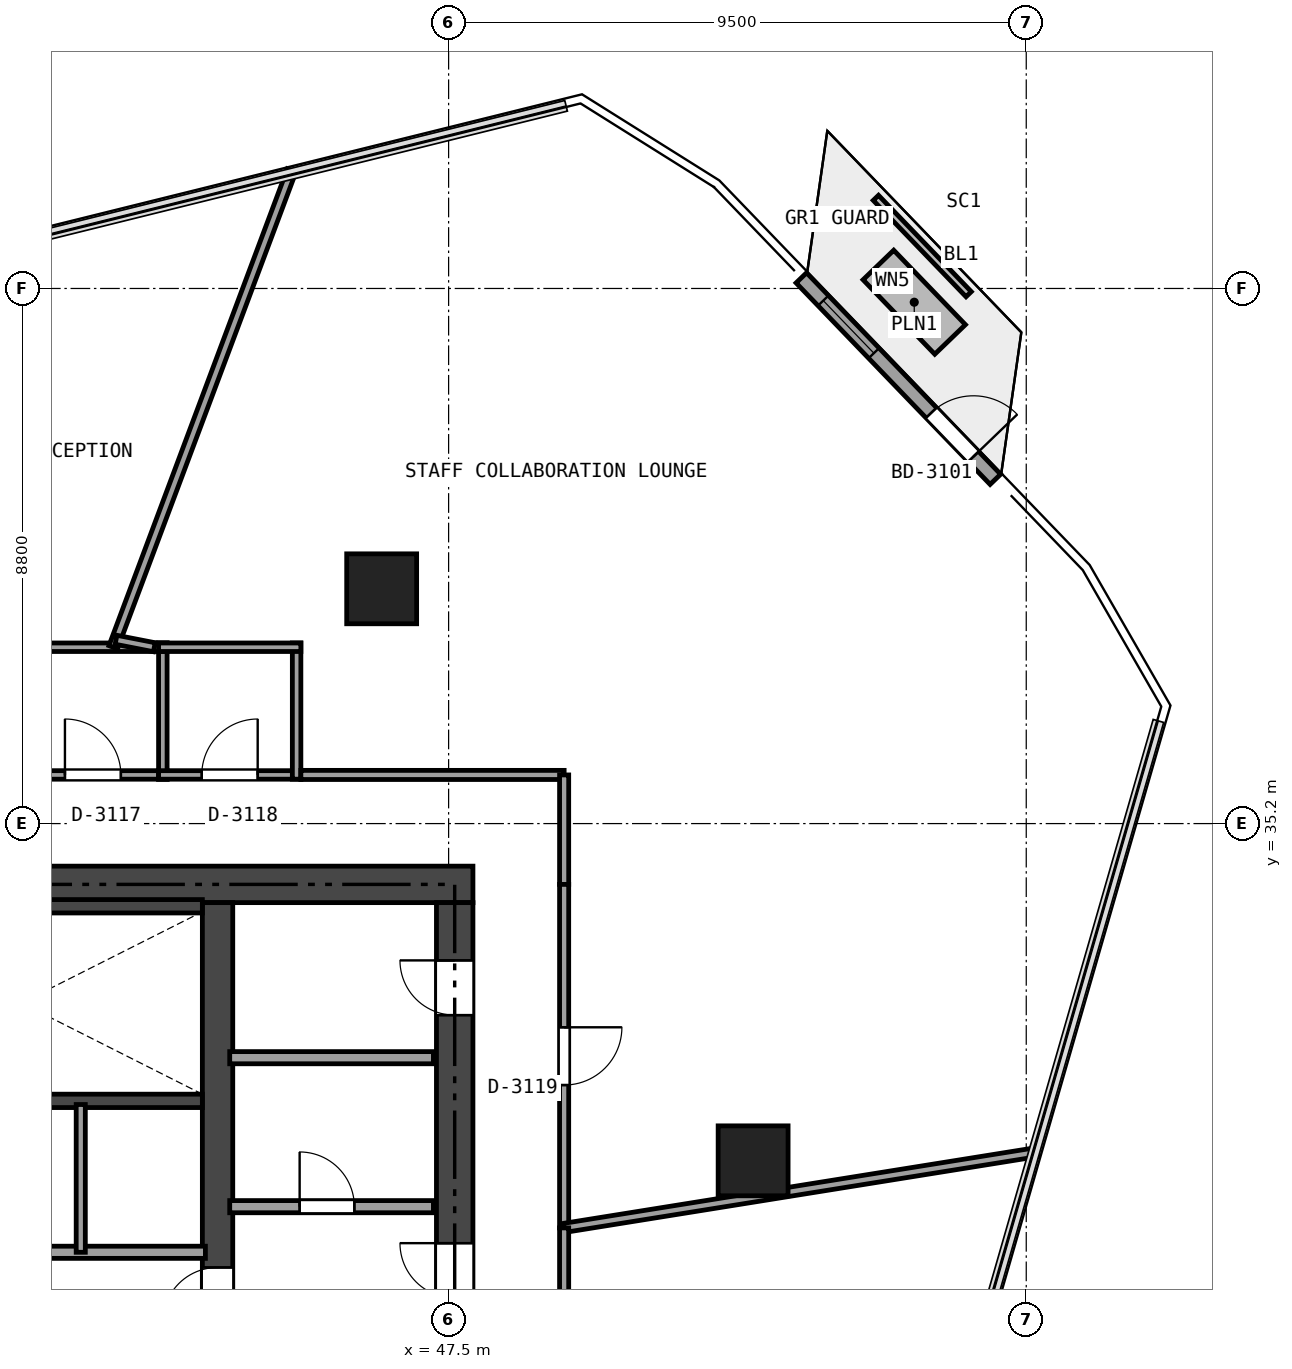
"""IFC4 building model, lengths in metres.
Left out: names, types, materials, properties, quantities, classifications, styles, units other than length and angle.
Written with IfcOpenShell. Run it as: python <this file> out.ifc"""

import sys

from ifc_helpers import new_model, si_unit, direction, frame, frame_2d, origin, origin_2d, place, context, subcontext, project, spatial, rectangle, extrude, element, fill, save


model = new_model("IFC4")
c1 = context("Model", 3, precision=1e-05, world=origin(), true_north=direction((0.0, 1.0)))
c2 = subcontext(c1, "Body", "Model", "MODEL_VIEW")
j1 = project(units=[si_unit("LENGTHUNIT", "METRE"), si_unit("PLANEANGLEUNIT", "RADIAN")], contexts=[c1])
p1 = place(None, origin())
s1 = spatial("IfcSite", under=j1, at=p1, CompositionType="ELEMENT")
p2 = place(p1, origin())
s2 = spatial("IfcBuilding", under=s1, at=p2, CompositionType="ELEMENT")
p3 = place(p2, frame((0.0, 0.0, 117.75)))
s3 = spatial("IfcBuildingStorey", under=s2, at=p3, CompositionType="ELEMENT", Elevation=117.75)
p4 = place(p3, frame((26.5, 34.2, 0.0), z_axis=(0.0, 0.0, 1.0), x_axis=(1.0, 0.0, 0.0)))
e1 = element("IfcWall", 1, at=p4, inside=s3, PredefinedType="SHEAR", context=c2, shape_type="SweptSolid", body=[
    extrude(rectangle(XDim=21.4, YDim=0.6, at=frame_2d((10.7, 0.0))), origin(), (0.0, 0.0, 1.0), 3.09),
])
p5 = place(p4, frame((9.7, 0.0, 0.0)))
e2 = element("IfcOpeningElement", 2, at=p5, cuts=e1, PredefinedType="OPENING", context=c2, shape_type="SweptSolid", body=[
    extrude(rectangle(XDim=1.1, YDim=2.15, at=frame_2d((0.55, 1.075))), frame((0.0, 0.31, 0.0), z_axis=(0.0, -1.0, 0.0), x_axis=(1.0, 0.0, 0.0)), (0.0, 0.0, 1.0), 0.62),
])
p6 = place(p4, frame((1.95, 0.0, 0.0)))
e3 = element("IfcOpeningElement", 3, at=p6, cuts=e1, PredefinedType="OPENING", context=c2, shape_type="SweptSolid", body=[
    extrude(rectangle(XDim=0.9, YDim=2.1, at=frame_2d((0.45, 1.05))), frame((0.0, 0.31, 0.0), z_axis=(0.0, -1.0, 0.0), x_axis=(1.0, 0.0, 0.0)), (0.0, 0.0, 1.0), 0.62),
])
p7 = place(p4, frame((6.25, 0.0, 0.0)))
e4 = element("IfcOpeningElement", 4, at=p7, cuts=e1, PredefinedType="OPENING", context=c2, shape_type="SweptSolid", body=[
    extrude(rectangle(XDim=0.9, YDim=2.1, at=frame_2d((0.45, 1.05))), frame((0.0, 0.31, 0.0), z_axis=(0.0, -1.0, 0.0), x_axis=(1.0, 0.0, 0.0)), (0.0, 0.0, 1.0), 0.62),
])
p8 = place(p3, frame((47.6, 18.9, 0.0), z_axis=(0.0, 0.0, 1.0), x_axis=(0.0, 1.0, 0.0)))
e5 = element("IfcWall", 5, at=p8, inside=s3, PredefinedType="SHEAR", context=c2, shape_type="SweptSolid", body=[
    extrude(rectangle(XDim=15.0, YDim=0.6, at=frame_2d((7.5, 0.0))), origin(), (0.0, 0.0, 1.0), 3.09),
])
p9 = place(p8, frame((6.6, 0.0, 0.0)))
e6 = element("IfcOpeningElement", 6, at=p9, cuts=e5, PredefinedType="OPENING", context=c2, shape_type="SweptSolid", body=[
    extrude(rectangle(XDim=1.1, YDim=2.15, at=frame_2d((0.55, 1.075))), frame((0.0, 0.31, 0.0), z_axis=(0.0, -1.0, 0.0), x_axis=(1.0, 0.0, 0.0)), (0.0, 0.0, 1.0), 0.62),
])
p10 = place(p8, frame((8.5, 0.0, 0.0)))
e7 = element("IfcOpeningElement", 7, at=p10, cuts=e5, PredefinedType="OPENING", context=c2, shape_type="SweptSolid", body=[
    extrude(rectangle(XDim=0.9, YDim=2.1, at=frame_2d((0.45, 1.05))), frame((0.0, 0.31, 0.0), z_axis=(0.0, -1.0, 0.0), x_axis=(1.0, 0.0, 0.0)), (0.0, 0.0, 1.0), 0.62),
])
p11 = place(p8, frame((13.15, 0.0, 0.0)))
e8 = element("IfcOpeningElement", 8, at=p11, cuts=e5, PredefinedType="OPENING", context=c2, shape_type="SweptSolid", body=[
    extrude(rectangle(XDim=0.9, YDim=2.1, at=frame_2d((0.45, 1.05))), frame((0.0, 0.31, 0.0), z_axis=(0.0, -1.0, 0.0), x_axis=(1.0, 0.0, 0.0)), (0.0, 0.0, 1.0), 0.62),
])
p12 = place(p3, frame((43.7, 18.9, 0.0), z_axis=(0.0, 0.0, 1.0), x_axis=(0.0, 1.0, 0.0)))
e9 = element("IfcWall", 9, at=p12, inside=s3, PredefinedType="SHEAR", context=c2, shape_type="SweptSolid", body=[
    extrude(rectangle(XDim=15.0, YDim=0.5, at=frame_2d((7.5, 0.0))), origin(), (0.0, 0.0, 1.0), 3.09),
])
p13 = place(p12, frame((8.1, 0.0, 0.0)))
e10 = element("IfcOpeningElement", 10, at=p13, cuts=e9, PredefinedType="OPENING", context=c2, shape_type="SweptSolid", body=[
    extrude(rectangle(XDim=0.9, YDim=2.1, at=frame_2d((0.45, 1.05))), frame((0.0, 0.26, 0.0), z_axis=(0.0, -1.0, 0.0), x_axis=(1.0, 0.0, 0.0)), (0.0, 0.0, 1.0), 0.52),
])
p14 = place(p3, frame((35.84, 30.64, 0.0), z_axis=(0.0, 0.0, 1.0), x_axis=(1.0, 0.0, 0.0)))
e11 = element("IfcWall", 11, at=p14, inside=s3, PredefinedType="SHEAR", context=c2, shape_type="SweptSolid", body=[
    extrude(rectangle(XDim=7.61, YDim=0.22, at=frame_2d((3.805, 0.0))), origin(), (0.0, 0.0, 1.0), 3.09),
])
p15 = place(p3, frame((37.55, 33.84, 0.0), z_axis=(0.0, 0.0, 1.0), x_axis=(1.0, 0.0, 0.0)))
e12 = element("IfcWall", 12, at=p15, inside=s3, PredefinedType="SHEAR", context=c2, shape_type="SweptSolid", body=[
    extrude(rectangle(XDim=5.9, YDim=0.22, at=frame_2d((2.95, 0.0))), origin(), (0.0, 0.0, 1.0), 3.09),
])
for number, where, z_axis, x_axis in (
    (13, (52.508, 29.654, 0.0), (0.0, 0.0, 1.0), (1.0, 0.0, 0.0)),
    (14, (46.399, 39.061, 0.0), (0.0, 0.0, 1.0), (1.0, 0.0, 0.0)),
):
    element("IfcColumn", number, at=place(p3, frame(where, z_axis=z_axis, x_axis=x_axis)), inside=s3, PredefinedType="COLUMN", context=c2, shape_type="SweptSolid", body=[
        extrude(rectangle(XDim=1.15, YDim=1.15, at=origin_2d()), origin(), (0.0, 0.0, 1.0), 3.09),
    ])
p16 = place(p3, frame((53.301, 44.175, 0.0), z_axis=(0.0, 0.0, 1.0), x_axis=(0.693607012238, -0.720353602458, 0.0)))
e15 = element("IfcWall", 15, at=p16, inside=s3, PredefinedType="SOLIDWALL", context=c2, shape_type="SweptSolid", body=[
    extrude(rectangle(XDim=4.601, YDim=0.24, at=frame_2d((2.3, 0.0))), origin(), (0.0, 0.0, 1.0), 3.09),
])
p17 = place(p16, frame((3.081, 0.0, 0.0)))
e16 = element("IfcOpeningElement", 16, at=p17, cuts=e15, PredefinedType="OPENING", context=c2, shape_type="SweptSolid", body=[
    extrude(rectangle(XDim=1.0, YDim=2.15, at=frame_2d((0.5, 1.075))), frame((0.0, 0.13, 0.0), z_axis=(0.0, -1.0, 0.0), x_axis=(1.0, 0.0, 0.0)), (0.0, 0.0, 1.0), 0.26),
])
p18 = place(p16, frame((0.52, 0.0, 0.2)))
e17 = element("IfcOpeningElement", 17, at=p18, cuts=e15, PredefinedType="OPENING", context=c2, shape_type="SweptSolid", body=[
    extrude(rectangle(XDim=1.2, YDim=1.8, at=frame_2d((0.6, 0.9))), frame((0.0, 0.13, 0.0), z_axis=(0.0, -1.0, 0.0), x_axis=(1.0, 0.0, 0.0)), (0.0, 0.0, 1.0), 0.26),
])
p19 = place(p3, frame((43.9, 28.9, 0.0), z_axis=(0.0, 0.0, 1.0), x_axis=(1.0, 0.0, 0.0)))
e18 = element("IfcWall", 18, at=p19, inside=s3, PredefinedType="SOLIDWALL", context=c2, shape_type="SweptSolid", body=[
    extrude(rectangle(XDim=3.35, YDim=0.2, at=frame_2d((1.675, 0.0))), origin(), (0.0, 0.0, 1.0), 3.09),
])
p20 = place(p19, frame((1.15, 0.0, 0.0)))
e19 = element("IfcOpeningElement", 19, at=p20, cuts=e18, PredefinedType="OPENING", context=c2, shape_type="SweptSolid", body=[
    extrude(rectangle(XDim=0.9, YDim=2.1, at=frame_2d((0.45, 1.05))), frame((0.0, 0.11, 0.0), z_axis=(0.0, -1.0, 0.0), x_axis=(1.0, 0.0, 0.0)), (0.0, 0.0, 1.0), 0.22),
])
p21 = place(p3, frame((43.9, 31.35, 0.0), z_axis=(0.0, 0.0, 1.0), x_axis=(1.0, 0.0, 0.0)))
e20 = element("IfcWall", 20, at=p21, inside=s3, PredefinedType="SOLIDWALL", context=c2, shape_type="SweptSolid", body=[
    extrude(rectangle(XDim=3.35, YDim=0.2, at=frame_2d((1.675, 0.0))), origin(), (0.0, 0.0, 1.0), 3.09),
])
p22 = place(p3, frame((35.62, 28.15, 0.0), z_axis=(0.0, 0.0, 1.0), x_axis=(1.0, 0.0, 0.0)))
e21 = element("IfcWall", 21, at=p22, inside=s3, PredefinedType="SOLIDWALL", context=c2, shape_type="SweptSolid", body=[
    extrude(rectangle(XDim=7.88, YDim=0.2, at=frame_2d((3.94, 0.0))), origin(), (0.0, 0.0, 1.0), 3.09),
])
p23 = place(p3, frame((41.45, 28.15, 0.0), z_axis=(0.0, 0.0, 1.0), x_axis=(0.0, 1.0, 0.0)))
e22 = element("IfcWall", 22, at=p23, inside=s3, PredefinedType="PARTITIONING", context=c2, shape_type="SweptSolid", body=[
    extrude(rectangle(XDim=2.43, YDim=0.15, at=frame_2d((1.215, 0.0))), origin(), (0.0, 0.0, 1.0), 3.09),
])
p24 = place(p3, frame((40.43, 36.0, 0.0), z_axis=(0.0, 0.0, 1.0), x_axis=(1.0, 0.0, 0.0)))
e23 = element("IfcWall", 23, at=p24, inside=s3, PredefinedType="PARTITIONING", context=c2, shape_type="SweptSolid", body=[
    extrude(rectangle(XDim=2.44, YDim=0.14, at=frame_2d((1.22, 0.0))), origin(), (0.0, 0.0, 1.0), 2.763),
])
p25 = place(p24, frame((0.76, 0.0, 0.0)))
e24 = element("IfcOpeningElement", 24, at=p25, cuts=e23, PredefinedType="OPENING", context=c2, shape_type="SweptSolid", body=[
    extrude(rectangle(XDim=0.92, YDim=2.1, at=frame_2d((0.46, 1.05))), frame((0.0, 0.08, 0.0), z_axis=(0.0, -1.0, 0.0), x_axis=(1.0, 0.0, 0.0)), (0.0, 0.0, 1.0), 0.16),
])
p26 = place(p3, frame((42.8, 35.93, 0.0), z_axis=(0.0, 0.0, 1.0), x_axis=(0.0, 1.0, 0.0)))
e25 = element("IfcWall", 25, at=p26, inside=s3, PredefinedType="PARTITIONING", context=c2, shape_type="SweptSolid", body=[
    extrude(rectangle(XDim=2.24, YDim=0.14, at=frame_2d((1.12, 0.0))), origin(), (0.0, 0.0, 1.0), 2.667),
])
p27 = place(p3, frame((42.87, 38.1, 0.0), z_axis=(0.0, 0.0, 1.0), x_axis=(-1.0, 0.0, 0.0)))
e26 = element("IfcWall", 26, at=p27, inside=s3, PredefinedType="PARTITIONING", context=c2, shape_type="SweptSolid", body=[
    extrude(rectangle(XDim=2.44, YDim=0.14, at=frame_2d((1.22, 0.0))), origin(), (0.0, 0.0, 1.0), 2.667),
])
p28 = place(p3, frame((42.73, 36.0, 0.0), z_axis=(0.0, 0.0, 1.0), x_axis=(1.0, 0.0, 0.0)))
e27 = element("IfcWall", 27, at=p28, inside=s3, PredefinedType="PARTITIONING", context=c2, shape_type="SweptSolid", body=[
    extrude(rectangle(XDim=2.34, YDim=0.14, at=frame_2d((1.17, 0.0))), origin(), (0.0, 0.0, 1.0), 2.387),
])
p29 = place(p28, frame((0.71, 0.0, 0.0)))
e28 = element("IfcOpeningElement", 28, at=p29, cuts=e27, PredefinedType="OPENING", context=c2, shape_type="SweptSolid", body=[
    extrude(rectangle(XDim=0.92, YDim=2.1, at=frame_2d((0.46, 1.05))), frame((0.0, 0.08, 0.0), z_axis=(0.0, -1.0, 0.0), x_axis=(1.0, 0.0, 0.0)), (0.0, 0.0, 1.0), 0.16),
])
p30 = place(p3, frame((45.0, 35.93, 0.0), z_axis=(0.0, 0.0, 1.0), x_axis=(0.0, 1.0, 0.0)))
e29 = element("IfcWall", 29, at=p30, inside=s3, PredefinedType="PARTITIONING", context=c2, shape_type="SweptSolid", body=[
    extrude(rectangle(XDim=2.24, YDim=0.14, at=frame_2d((1.12, 0.0))), origin(), (0.0, 0.0, 1.0), 2.387),
])
p31 = place(p3, frame((45.07, 38.1, 0.0), z_axis=(0.0, 0.0, 1.0), x_axis=(-1.0, 0.0, 0.0)))
e30 = element("IfcWall", 30, at=p31, inside=s3, PredefinedType="PARTITIONING", context=c2, shape_type="SweptSolid", body=[
    extrude(rectangle(XDim=2.34, YDim=0.14, at=frame_2d((1.17, 0.0))), origin(), (0.0, 0.0, 1.0), 2.667),
])
p32 = place(p3, frame((44.919, 45.942, 0.0), z_axis=(0.0, 0.0, 1.0), x_axis=(-0.350535422713, -0.936549474093, 0.0)))
e31 = element("IfcWall", 31, at=p32, inside=s3, PredefinedType="PARTITIONING", context=c2, shape_type="SweptSolid", body=[
    extrude(rectangle(XDim=8.373, YDim=0.15, at=frame_2d((4.187, 0.0))), origin(), (0.0, 0.0, 1.0), 2.375),
])
p33 = place(p3, frame((42.03, 38.223, 0.0), z_axis=(0.0, 0.0, 1.0), x_axis=(0.981520230149, -0.191358401459, 0.0)))
e32 = element("IfcWall", 32, at=p33, inside=s3, PredefinedType="PARTITIONING", context=c2, shape_type="SweptSolid", body=[
    extrude(rectangle(XDim=0.642, YDim=0.15, at=frame_2d((0.321, 0.0))), origin(), (0.0, 0.0, 1.0), 2.667),
])
p34 = place(p3, frame((45.07, 36.0, 0.0), z_axis=(0.0, 0.0, 1.0), x_axis=(1.0, 0.0, 0.0)))
e33 = element("IfcWall", 33, at=p34, inside=s3, PredefinedType="PARTITIONING", context=c2, shape_type="SweptSolid", body=[
    extrude(rectangle(XDim=4.33, YDim=0.15, at=frame_2d((2.165, 0.0))), origin(), (0.0, 0.0, 1.0), 2.375),
])
p35 = place(p3, frame((49.4, 36.0, 0.0), z_axis=(0.0, 0.0, 1.0), x_axis=(0.0, -1.0, 0.0)))
e34 = element("IfcWall", 34, at=p35, inside=s3, PredefinedType="PARTITIONING", context=c2, shape_type="SweptSolid", body=[
    extrude(rectangle(XDim=1.8, YDim=0.15, at=frame_2d((0.9, 0.0))), origin(), (0.0, 0.0, 1.0), 2.375),
])
p36 = place(p3, frame((49.4, 34.2, 0.0), z_axis=(0.0, 0.0, 1.0), x_axis=(0.0, -1.0, 0.0)))
e35 = element("IfcWall", 35, at=p36, inside=s3, PredefinedType="PARTITIONING", context=c2, shape_type="SweptSolid", body=[
    extrude(rectangle(XDim=5.649, YDim=0.15, at=frame_2d((2.824, 0.0))), origin(), (0.0, 0.0, 1.0), 2.375),
])
p37 = place(p36, frame((2.35, 0.0, 0.0)))
e36 = element("IfcOpeningElement", 36, at=p37, cuts=e35, PredefinedType="OPENING", context=c2, shape_type="SweptSolid", body=[
    extrude(rectangle(XDim=0.95, YDim=2.15, at=frame_2d((0.475, 1.075))), frame((0.0, 0.085, 0.0), z_axis=(0.0, -1.0, 0.0), x_axis=(1.0, 0.0, 0.0)), (0.0, 0.0, 1.0), 0.17),
])
p38 = place(p3, frame((49.4, 28.551, 0.0), z_axis=(0.0, 0.0, 1.0), x_axis=(0.987395734104, 0.158270857307, 0.0)))
e37 = element("IfcWall", 37, at=p38, inside=s3, PredefinedType="PARTITIONING", context=c2, shape_type="SweptSolid", body=[
    extrude(rectangle(XDim=7.879, YDim=0.15, at=frame_2d((3.94, 0.0))), origin(), (0.0, 0.0, 1.0), 2.375),
])
p39 = place(p3, frame((49.4, 28.551, 0.0), z_axis=(0.0, 0.0, 1.0), x_axis=(0.0, -1.0, 0.0)))
e38 = element("IfcWall", 38, at=p39, inside=s3, PredefinedType="PARTITIONING", context=c2, shape_type="SweptSolid", body=[
    extrude(rectangle(XDim=9.951, YDim=0.15, at=frame_2d((4.976, 0.0))), origin(), (0.0, 0.0, 1.0), 2.375),
])
p40 = place(p39, frame((4.5, 0.0, 0.0)))
e39 = element("IfcOpeningElement", 39, at=p40, cuts=e38, PredefinedType="OPENING", context=c2, shape_type="SweptSolid", body=[
    extrude(rectangle(XDim=0.95, YDim=2.15, at=frame_2d((0.475, 1.075))), frame((0.0, 0.085, 0.0), z_axis=(0.0, -1.0, 0.0), x_axis=(1.0, 0.0, 0.0)), (0.0, 0.0, 1.0), 0.17),
])
p41 = place(p17, origin())
e40 = element("IfcDoor", 40, at=p41, inside=s3, OperationType="SINGLE_SWING_RIGHT", PredefinedType="DOOR", context=c2, shape_type="SweptSolid", body=[
    extrude(rectangle(XDim=1.0, YDim=2.15, at=frame_2d((0.5, 1.075))), frame((0.0, 0.025, 0.0), z_axis=(0.0, -1.0, 0.0), x_axis=(1.0, 0.0, 0.0)), (0.0, 0.0, 1.0), 0.05),
])
fill(e16, e40)
p42 = place(p18, origin())
e41 = element("IfcWindow", 41, at=p42, inside=s3, PartitioningType="SINGLE_PANEL", PredefinedType="WINDOW", context=c2, shape_type="SweptSolid", body=[
    extrude(rectangle(XDim=1.2, YDim=1.8, at=frame_2d((0.6, 0.9))), frame((0.0, 0.03, 0.0), z_axis=(0.0, -1.0, 0.0), x_axis=(1.0, 0.0, 0.0)), (0.0, 0.0, 1.0), 0.06),
])
fill(e17, e41)
p43 = place(p13, origin())
e42 = element("IfcDoor", 42, at=p43, inside=s3, OperationType="SINGLE_SWING_LEFT", PredefinedType="DOOR", context=c2, shape_type="SweptSolid", body=[
    extrude(rectangle(XDim=0.9, YDim=2.1, at=frame_2d((0.45, 1.05))), frame((0.0, 0.025, 0.0), z_axis=(0.0, -1.0, 0.0), x_axis=(1.0, 0.0, 0.0)), (0.0, 0.0, 1.0), 0.05),
])
fill(e10, e42)
p44 = place(p10, origin())
e43 = element("IfcDoor", 43, at=p44, inside=s3, OperationType="SINGLE_SWING_RIGHT", PredefinedType="DOOR", context=c2, shape_type="SweptSolid", body=[
    extrude(rectangle(XDim=0.9, YDim=2.1, at=frame_2d((0.45, 1.05))), frame((0.0, 0.025, 0.0), z_axis=(0.0, -1.0, 0.0), x_axis=(1.0, 0.0, 0.0)), (0.0, 0.0, 1.0), 0.05),
])
fill(e7, e43)
p45 = place(p20, origin())
e44 = element("IfcDoor", 44, at=p45, inside=s3, OperationType="SINGLE_SWING_LEFT", PredefinedType="DOOR", context=c2, shape_type="SweptSolid", body=[
    extrude(rectangle(XDim=0.9, YDim=2.1, at=frame_2d((0.45, 1.05))), frame((0.0, 0.025, 0.0), z_axis=(0.0, -1.0, 0.0), x_axis=(1.0, 0.0, 0.0)), (0.0, 0.0, 1.0), 0.05),
])
fill(e19, e44)
p46 = place(p11, origin())
e45 = element("IfcDoor", 45, at=p46, inside=s3, OperationType="SINGLE_SWING_RIGHT", PredefinedType="DOOR", context=c2, shape_type="SweptSolid", body=[
    extrude(rectangle(XDim=0.9, YDim=2.1, at=frame_2d((0.45, 1.05))), frame((0.0, 0.025, 0.0), z_axis=(0.0, -1.0, 0.0), x_axis=(1.0, 0.0, 0.0)), (0.0, 0.0, 1.0), 0.05),
])
fill(e8, e45)
p47 = place(p25, origin())
e46 = element("IfcDoor", 46, at=p47, inside=s3, OperationType="SINGLE_SWING_LEFT", PredefinedType="DOOR", context=c2, shape_type="SweptSolid", body=[
    extrude(rectangle(XDim=0.92, YDim=2.1, at=frame_2d((0.46, 1.05))), frame((0.0, 0.025, 0.0), z_axis=(0.0, -1.0, 0.0), x_axis=(1.0, 0.0, 0.0)), (0.0, 0.0, 1.0), 0.05),
])
fill(e24, e46)
p48 = place(p29, origin())
e47 = element("IfcDoor", 47, at=p48, inside=s3, OperationType="SINGLE_SWING_RIGHT", PredefinedType="DOOR", context=c2, shape_type="SweptSolid", body=[
    extrude(rectangle(XDim=0.92, YDim=2.1, at=frame_2d((0.46, 1.05))), frame((0.0, 0.025, 0.0), z_axis=(0.0, -1.0, 0.0), x_axis=(1.0, 0.0, 0.0)), (0.0, 0.0, 1.0), 0.05),
])
fill(e28, e47)
p49 = place(p37, origin())
e48 = element("IfcDoor", 48, at=p49, inside=s3, OperationType="SINGLE_SWING_LEFT", PredefinedType="DOOR", context=c2, shape_type="SweptSolid", body=[
    extrude(rectangle(XDim=0.95, YDim=2.15, at=frame_2d((0.475, 1.075))), frame((0.0, 0.025, 0.0), z_axis=(0.0, -1.0, 0.0), x_axis=(1.0, 0.0, 0.0)), (0.0, 0.0, 1.0), 0.05),
])
fill(e36, e48)
save(model, sys.argv[1])
